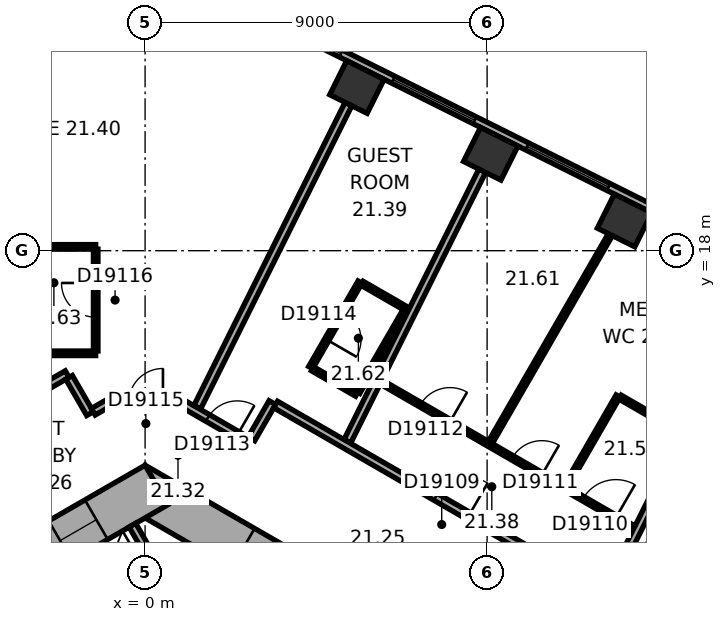
"""IFC4 building model, lengths in metres.
Left out: names, types, materials, properties, quantities, classifications, styles, units other than length and angle.
Written with IfcOpenShell. Run it as: python <this file> out.ifc"""

import sys

from ifc_helpers import new_model, si_unit, direction, frame, frame_2d, origin, origin_2d, place, context, subcontext, project, spatial, rectangle, extrude, element, fill, save


model = new_model("IFC4")
c1 = context("Model", 3, precision=1e-05, world=origin(), true_north=direction((0.0, 1.0)))
c2 = subcontext(c1, "Body", "Model", "MODEL_VIEW")
j1 = project(units=[si_unit("LENGTHUNIT", "METRE"), si_unit("PLANEANGLEUNIT", "RADIAN")], contexts=[c1])
p1 = place(None, origin())
s1 = spatial("IfcSite", under=j1, at=p1, CompositionType="ELEMENT")
p2 = place(p1, origin())
s2 = spatial("IfcBuilding", under=s1, at=p2, CompositionType="ELEMENT")
p3 = place(p2, frame((0.0, 0.0, 93.5)))
s3 = spatial("IfcBuildingStorey", under=s2, at=p3, CompositionType="ELEMENT", Elevation=93.5)
for number, where, z_axis, x_axis in (
    (1, (12.616, 18.795, 0.0), (0.0, 0.0, 1.0), (-0.895, 0.446, 0.0)),
    (2, (9.095, 20.551, 0.0), (0.0, 0.0, 1.0), (-0.895, 0.446, 0.0)),
    (3, (5.574, 22.306, 0.0), (0.0, 0.0, 1.0), (-0.895, 0.446, 0.0)),
):
    element("IfcColumn", number, at=place(p3, frame(where, z_axis=z_axis, x_axis=x_axis)), inside=s3, PredefinedType="COLUMN", context=c2, shape_type="SweptSolid", body=[
        extrude(rectangle(XDim=1.1, YDim=1.0, at=origin_2d()), origin(), (0.0, 0.0, 1.0), 3.3),
    ])
p4 = place(p3, frame((10.4, 5.658, 0.0), z_axis=(0.0, 0.0, 1.0), x_axis=(-0.866021384402, 0.500006961711, 0.0)))
e4 = element("IfcWall", 4, at=p4, inside=s3, PredefinedType="SHEAR", context=c2, shape_type="SweptSolid", body=[
    extrude(rectangle(XDim=12.355, YDim=1.2, at=frame_2d((6.178, 0.0))), origin(), (0.0, 0.0, 1.0), 3.3),
])
p5 = place(p4, frame((2.728, 0.0, 0.0)))
e5 = element("IfcOpeningElement", 5, at=p5, cuts=e4, PredefinedType="OPENING", context=c2, shape_type="SweptSolid", body=[
    extrude(rectangle(XDim=1.1, YDim=2.1, at=frame_2d((0.55, 1.05))), frame((0.0, 0.61, 0.0), z_axis=(0.0, -1.0, 0.0), x_axis=(1.0, 0.0, 0.0)), (0.0, 0.0, 1.0), 1.22),
])
p6 = place(p4, frame((5.328, 0.0, 0.0)))
e6 = element("IfcOpeningElement", 6, at=p6, cuts=e4, PredefinedType="OPENING", context=c2, shape_type="SweptSolid", body=[
    extrude(rectangle(XDim=1.1, YDim=2.1, at=frame_2d((0.55, 1.05))), frame((0.0, 0.61, 0.0), z_axis=(0.0, -1.0, 0.0), x_axis=(1.0, 0.0, 0.0)), (0.0, 0.0, 1.0), 1.22),
])
p7 = place(p4, frame((7.928, 0.0, 0.0)))
e7 = element("IfcOpeningElement", 7, at=p7, cuts=e4, PredefinedType="OPENING", context=c2, shape_type="SweptSolid", body=[
    extrude(rectangle(XDim=1.1, YDim=2.1, at=frame_2d((0.55, 1.05))), frame((0.0, 0.61, 0.0), z_axis=(0.0, -1.0, 0.0), x_axis=(1.0, 0.0, 0.0)), (0.0, 0.0, 1.0), 1.22),
])
p8 = place(p3, frame((0.3, 11.836, 0.0), z_axis=(0.0, 0.0, 1.0), x_axis=(-0.866021384402, -0.500006961711, 0.0)))
e8 = element("IfcWall", 8, at=p8, inside=s3, PredefinedType="SHEAR", context=c2, shape_type="SweptSolid", body=[
    extrude(rectangle(XDim=12.355, YDim=1.2, at=frame_2d((6.178, 0.0))), origin(), (0.0, 0.0, 1.0), 3.3),
])
p9 = place(p8, frame((6.378, 0.0, 0.0)))
e9 = element("IfcOpeningElement", 9, at=p9, cuts=e8, PredefinedType="OPENING", context=c2, shape_type="SweptSolid", body=[
    extrude(rectangle(XDim=1.5, YDim=2.1, at=frame_2d((0.75, 1.05))), frame((0.0, 0.61, 0.0), z_axis=(0.0, -1.0, 0.0), x_axis=(1.0, 0.0, 0.0)), (0.0, 0.0, 1.0), 1.22),
])
p10 = place(p8, frame((1.828, 0.0, 0.0)))
e10 = element("IfcOpeningElement", 10, at=p10, cuts=e8, PredefinedType="OPENING", context=c2, shape_type="SweptSolid", body=[
    extrude(rectangle(XDim=1.1, YDim=2.1, at=frame_2d((0.55, 1.05))), frame((0.0, 0.61, 0.0), z_axis=(0.0, -1.0, 0.0), x_axis=(1.0, 0.0, 0.0)), (0.0, 0.0, 1.0), 1.22),
])
p11 = place(p3, frame((20.63, 15.47, 0.0), z_axis=(0.0, 0.0, 1.0), x_axis=(-0.894934518609, 0.446197498203, 0.0)))
e11 = element("IfcWall", 11, at=p11, inside=s3, PredefinedType="STANDARD", context=c2, shape_type="SweptSolid", body=[
    extrude(rectangle(XDim=21.246, YDim=0.2, at=frame_2d((10.623, 0.0))), origin(), (0.0, 0.0, 1.0), 3.3),
])
p12 = place(p11, frame((1.553, 0.0, 0.8)))
e12 = element("IfcOpeningElement", 12, at=p12, cuts=e11, PredefinedType="OPENING", context=c2, shape_type="SweptSolid", body=[
    extrude(rectangle(XDim=2.4, YDim=1.7, at=frame_2d((1.2, 0.85))), frame((0.0, 0.11, 0.0), z_axis=(0.0, -1.0, 0.0), x_axis=(1.0, 0.0, 0.0)), (0.0, 0.0, 1.0), 0.22),
])
p13 = place(p11, frame((5.488, 0.0, 0.8)))
e13 = element("IfcOpeningElement", 13, at=p13, cuts=e11, PredefinedType="OPENING", context=c2, shape_type="SweptSolid", body=[
    extrude(rectangle(XDim=2.4, YDim=1.7, at=frame_2d((1.2, 0.85))), frame((0.0, 0.11, 0.0), z_axis=(0.0, -1.0, 0.0), x_axis=(1.0, 0.0, 0.0)), (0.0, 0.0, 1.0), 0.22),
])
p14 = place(p11, frame((9.422, 0.0, 0.8)))
e14 = element("IfcOpeningElement", 14, at=p14, cuts=e11, PredefinedType="OPENING", context=c2, shape_type="SweptSolid", body=[
    extrude(rectangle(XDim=2.4, YDim=1.7, at=frame_2d((1.2, 0.85))), frame((0.0, 0.11, 0.0), z_axis=(0.0, -1.0, 0.0), x_axis=(1.0, 0.0, 0.0)), (0.0, 0.0, 1.0), 0.22),
])
p15 = place(p11, frame((13.357, 0.0, 0.8)))
e15 = element("IfcOpeningElement", 15, at=p15, cuts=e11, PredefinedType="OPENING", context=c2, shape_type="SweptSolid", body=[
    extrude(rectangle(XDim=2.4, YDim=1.7, at=frame_2d((1.2, 0.85))), frame((0.0, 0.11, 0.0), z_axis=(0.0, -1.0, 0.0), x_axis=(1.0, 0.0, 0.0)), (0.0, 0.0, 1.0), 0.22),
])
p16 = place(p11, frame((17.292, 0.0, 0.8)))
e16 = element("IfcOpeningElement", 16, at=p16, cuts=e11, PredefinedType="OPENING", context=c2, shape_type="SweptSolid", body=[
    extrude(rectangle(XDim=2.4, YDim=1.7, at=frame_2d((1.2, 0.85))), frame((0.0, 0.11, 0.0), z_axis=(0.0, -1.0, 0.0), x_axis=(1.0, 0.0, 0.0)), (0.0, 0.0, 1.0), 0.22),
])
p17 = place(p3, frame((0.767, 8.872, 0.0), z_axis=(0.0, 0.0, 1.0), x_axis=(-0.499994660107, 0.866028486751, 0.0)))
e17 = element("IfcWall", 17, at=p17, inside=s3, PredefinedType="PARTITIONING", context=c2, shape_type="SweptSolid", body=[
    extrude(rectangle(XDim=2.2, YDim=0.2, at=frame_2d((1.1, 0.0))), origin(), (0.0, 0.0, 1.0), 3.05),
])
p18 = place(p3, frame((-3.44, 18.101, 0.0), z_axis=(0.0, 0.0, 1.0), x_axis=(1.0, 0.0, 0.0)))
e18 = element("IfcWall", 18, at=p18, inside=s3, PredefinedType="PARTITIONING", context=c2, shape_type="SweptSolid", body=[
    extrude(rectangle(XDim=2.14, YDim=0.12, at=frame_2d((1.07, 0.0))), origin(), (0.0, 0.0, 1.0), 3.05),
])
p19 = place(p3, frame((-2.05, 14.752, 0.0), z_axis=(0.0, 0.0, 1.0), x_axis=(-0.866030936828, -0.499990416364, 0.0)))
e19 = element("IfcWall", 19, at=p19, inside=s3, PredefinedType="PARTITIONING", context=c2, shape_type="SweptSolid", body=[
    extrude(rectangle(XDim=3.102, YDim=0.2, at=frame_2d((1.551, 0.0))), origin(), (0.0, 0.0, 1.0), 3.05),
])
p20 = place(p3, frame((-1.449, 13.712, 0.0), z_axis=(0.0, 0.0, 1.0), x_axis=(-0.499978356969, 0.866037899034, 0.0)))
e20 = element("IfcWall", 20, at=p20, inside=s3, PredefinedType="PARTITIONING", context=c2, shape_type="SweptSolid", body=[
    extrude(rectangle(XDim=1.101, YDim=0.2, at=frame_2d((0.551, 0.0))), origin(), (0.0, 0.0, 1.0), 3.05),
])
p21 = place(p3, frame((-1.3, 15.301, 0.0), z_axis=(0.0, 0.0, 1.0), x_axis=(-1.0, 0.0, 0.0)))
e21 = element("IfcWall", 21, at=p21, inside=s3, PredefinedType="PARTITIONING", context=c2, shape_type="SweptSolid", body=[
    extrude(rectangle(XDim=1.661, YDim=0.12, at=frame_2d((0.831, 0.0))), origin(), (0.0, 0.0, 1.0), 3.05),
])
p22 = place(p3, frame((-1.3, 18.041, 0.0), z_axis=(0.0, 0.0, 1.0), x_axis=(0.0, -1.0, 0.0)))
e22 = element("IfcWall", 22, at=p22, inside=s3, PredefinedType="PARTITIONING", context=c2, shape_type="SweptSolid", body=[
    extrude(rectangle(XDim=2.68, YDim=0.12, at=frame_2d((1.34, 0.0))), origin(), (0.0, 0.0, 1.0), 3.05),
])
p23 = place(p22, frame((0.89, 0.0, 0.0)))
e23 = element("IfcOpeningElement", 23, at=p23, cuts=e22, PredefinedType="OPENING", context=c2, shape_type="SweptSolid", body=[
    extrude(rectangle(XDim=0.9, YDim=2.1, at=frame_2d((0.45, 1.05))), frame((0.0, 0.07, 0.0), z_axis=(0.0, -1.0, 0.0), x_axis=(1.0, 0.0, 0.0)), (0.0, 0.0, 1.0), 0.14),
])
p24 = place(p3, frame((-0.95, 14.001, 0.0), z_axis=(0.0, 0.0, 1.0), x_axis=(-0.86609177584, -0.499885022602, 0.0)))
e24 = element("IfcWall", 24, at=p24, inside=s3, PredefinedType="PARTITIONING", context=c2, shape_type="SweptSolid", body=[
    extrude(rectangle(XDim=0.477, YDim=0.2, at=frame_2d((0.238, 0.0))), origin(), (0.0, 0.0, 1.0), 3.05),
])
p25 = place(p3, frame((0.95, 14.001, 0.0), z_axis=(0.0, 0.0, 1.0), x_axis=(-1.0, 0.0, 0.0)))
e25 = element("IfcWall", 25, at=p25, inside=s3, PredefinedType="PARTITIONING", context=c2, shape_type="SweptSolid", body=[
    extrude(rectangle(XDim=1.86, YDim=0.2, at=frame_2d((0.93, 0.0))), origin(), (0.0, 0.0, 1.0), 3.05),
])
p26 = place(p25, frame((0.48, 0.0, 0.0)))
e26 = element("IfcOpeningElement", 26, at=p26, cuts=e25, PredefinedType="OPENING", context=c2, shape_type="SweptSolid", body=[
    extrude(rectangle(XDim=0.9, YDim=2.1, at=frame_2d((0.45, 1.05))), frame((0.0, 0.11, 0.0), z_axis=(0.0, -1.0, 0.0), x_axis=(1.0, 0.0, 0.0)), (0.0, 0.0, 1.0), 0.22),
])
p27 = place(p3, frame((2.748, 12.962, 0.0), z_axis=(0.0, 0.0, 1.0), x_axis=(-0.866013897511, 0.50001992892, 0.0)))
e27 = element("IfcWall", 27, at=p27, inside=s3, PredefinedType="PARTITIONING", context=c2, shape_type="SweptSolid", body=[
    extrude(rectangle(XDim=2.037, YDim=0.2, at=frame_2d((1.018, 0.0))), origin(), (0.0, 0.0, 1.0), 3.05),
])
p28 = place(p27, frame((0.372, 0.0, 0.0)))
e28 = element("IfcOpeningElement", 28, at=p28, cuts=e27, PredefinedType="OPENING", context=c2, shape_type="SweptSolid", body=[
    extrude(rectangle(XDim=0.9, YDim=2.1, at=frame_2d((0.45, 1.05))), frame((0.0, 0.11, 0.0), z_axis=(0.0, -1.0, 0.0), x_axis=(1.0, 0.0, 0.0)), (0.0, 0.0, 1.0), 0.22),
])
p29 = place(p3, frame((3.349, 14.002, 0.0), z_axis=(0.0, 0.0, 1.0), x_axis=(-0.500074377092, -0.865982457891, 0.0)))
e29 = element("IfcWall", 29, at=p29, inside=s3, PredefinedType="PARTITIONING", context=c2, shape_type="SweptSolid", body=[
    extrude(rectangle(XDim=1.101, YDim=0.2, at=frame_2d((0.55, 0.0))), origin(), (0.0, 0.0, 1.0), 3.05),
])
p30 = place(p3, frame((4.356, 14.922, 0.0), z_axis=(0.0, 0.0, 1.0), x_axis=(0.499936506574, 0.866062058628, 0.0)))
e30 = element("IfcWall", 30, at=p30, inside=s3, PredefinedType="PARTITIONING", context=c2, shape_type="SweptSolid", body=[
    extrude(rectangle(XDim=2.6, YDim=0.12, at=frame_2d((1.3, 0.0))), origin(), (0.0, 0.0, 1.0), 3.05),
])
p31 = place(p30, frame((0.85, 0.0, 0.0)))
e31 = element("IfcOpeningElement", 31, at=p31, cuts=e30, PredefinedType="OPENING", context=c2, shape_type="SweptSolid", body=[
    extrude(rectangle(XDim=0.9, YDim=2.1, at=frame_2d((0.45, 1.05))), frame((0.0, 0.07, 0.0), z_axis=(0.0, -1.0, 0.0), x_axis=(1.0, 0.0, 0.0)), (0.0, 0.0, 1.0), 0.14),
])
p32 = place(p3, frame((5.351, 21.859, 0.0), z_axis=(0.0, 0.0, 1.0), x_axis=(-0.446205309328, -0.894930624086, 0.0)))
e32 = element("IfcWall", 32, at=p32, inside=s3, PredefinedType="PARTITIONING", context=c2, shape_type="SweptSolid", body=[
    extrude(rectangle(XDim=8.913, YDim=0.2, at=frame_2d((4.457, 0.0))), origin(), (0.0, 0.0, 1.0), 2.6),
])
p33 = place(p3, frame((5.569, 14.222, 0.0), z_axis=(0.0, 0.0, 1.0), x_axis=(-0.866036909293, 0.499980071345, 0.0)))
e33 = element("IfcWall", 33, at=p33, inside=s3, PredefinedType="PARTITIONING", context=c2, shape_type="SweptSolid", body=[
    extrude(rectangle(XDim=1.34, YDim=0.12, at=frame_2d((0.67, 0.0))), origin(), (0.0, 0.0, 1.0), 3.05),
])
p34 = place(p3, frame((5.708, 17.144, 0.0), z_axis=(0.0, 0.0, 1.0), x_axis=(0.866082447003, -0.499901185229, 0.0)))
e34 = element("IfcWall", 34, at=p34, inside=s3, PredefinedType="PARTITIONING", context=c2, shape_type="SweptSolid", body=[
    extrude(rectangle(XDim=1.34, YDim=0.12, at=frame_2d((0.67, 0.0))), origin(), (0.0, 0.0, 1.0), 3.05),
])
p35 = place(p3, frame((6.839, 16.422, 0.0), z_axis=(0.0, 0.0, 1.0), x_axis=(-0.50000366821, -0.866023285932, 0.0)))
e35 = element("IfcWall", 35, at=p35, inside=s3, PredefinedType="PARTITIONING", context=c2, shape_type="SweptSolid", body=[
    extrude(rectangle(XDim=2.48, YDim=0.12, at=frame_2d((1.24, 0.0))), origin(), (0.0, 0.0, 1.0), 3.05),
])
p36 = place(p3, frame((8.872, 20.104, 0.0), z_axis=(0.0, 0.0, 1.0), x_axis=(-0.446218378653, -0.894924107706, 0.0)))
e36 = element("IfcWall", 36, at=p36, inside=s3, PredefinedType="PARTITIONING", context=c2, shape_type="SweptSolid", body=[
    extrude(rectangle(XDim=7.95, YDim=0.2, at=frame_2d((3.975, 0.0))), origin(), (0.0, 0.0, 1.0), 3.05),
])
p37 = place(p3, frame((10.885, 9.652, 0.0), z_axis=(0.0, 0.0, 1.0), x_axis=(-0.866033868542, 0.499985338323, 0.0)))
e37 = element("IfcWall", 37, at=p37, inside=s3, PredefinedType="PARTITIONING", context=c2, shape_type="SweptSolid", body=[
    extrude(rectangle(XDim=8.602, YDim=0.2, at=frame_2d((4.301, 0.0))), origin(), (0.0, 0.0, 1.0), 3.05),
])
p38 = place(p37, frame((2.739, 0.0, 0.0)))
e38 = element("IfcOpeningElement", 38, at=p38, cuts=e37, PredefinedType="OPENING", context=c2, shape_type="SweptSolid", body=[
    extrude(rectangle(XDim=1.0, YDim=2.1, at=frame_2d((0.5, 1.05))), frame((0.0, 0.11, 0.0), z_axis=(0.0, -1.0, 0.0), x_axis=(1.0, 0.0, 0.0)), (0.0, 0.0, 1.0), 0.22),
])
p39 = place(p3, frame((12.243, 18.423, 0.0), z_axis=(0.0, 0.0, 1.0), x_axis=(-0.499993523031, -0.866029143232, 0.0)))
e39 = element("IfcWall", 39, at=p39, inside=s3, PredefinedType="PARTITIONING", context=c2, shape_type="SweptSolid", body=[
    extrude(rectangle(XDim=6.315, YDim=0.12, at=frame_2d((3.157, 0.0))), origin(), (0.0, 0.0, 1.0), 2.6),
])
p40 = place(p3, frame((12.448, 14.177, 0.0), z_axis=(0.0, 0.0, 1.0), x_axis=(-0.500048966069, -0.865997131366, 0.0)))
e40 = element("IfcWall", 40, at=p40, inside=s3, PredefinedType="PARTITIONING", context=c2, shape_type="SweptSolid", body=[
    extrude(rectangle(XDim=2.74, YDim=0.12, at=frame_2d((1.37, 0.0))), origin(), (0.0, 0.0, 1.0), 3.05),
])
p41 = place(p3, frame((12.866, 10.702, 0.0), z_axis=(0.0, 0.0, 1.0), x_axis=(-0.866023151433, 0.500003901167, 0.0)))
e41 = element("IfcWall", 41, at=p41, inside=s3, PredefinedType="PARTITIONING", context=c2, shape_type="SweptSolid", body=[
    extrude(rectangle(XDim=7.684, YDim=0.12, at=frame_2d((3.842, 0.0))), origin(), (0.0, 0.0, 1.0), 3.05),
])
p42 = place(p41, frame((0.55, 0.0, 0.0)))
e42 = element("IfcOpeningElement", 42, at=p42, cuts=e41, PredefinedType="OPENING", context=c2, shape_type="SweptSolid", body=[
    extrude(rectangle(XDim=1.0, YDim=2.1, at=frame_2d((0.5, 1.05))), frame((0.0, 0.07, 0.0), z_axis=(0.0, -1.0, 0.0), x_axis=(1.0, 0.0, 0.0)), (0.0, 0.0, 1.0), 0.14),
])
p43 = place(p41, frame((2.8, 0.0, 0.0)))
e43 = element("IfcOpeningElement", 43, at=p43, cuts=e41, PredefinedType="OPENING", context=c2, shape_type="SweptSolid", body=[
    extrude(rectangle(XDim=0.9, YDim=2.1, at=frame_2d((0.45, 1.05))), frame((0.0, 0.07, 0.0), z_axis=(0.0, -1.0, 0.0), x_axis=(1.0, 0.0, 0.0)), (0.0, 0.0, 1.0), 0.14),
])
p44 = place(p41, frame((5.592, 0.0, 0.0)))
e44 = element("IfcOpeningElement", 44, at=p44, cuts=e41, PredefinedType="OPENING", context=c2, shape_type="SweptSolid", body=[
    extrude(rectangle(XDim=0.9, YDim=2.1, at=frame_2d((0.45, 1.05))), frame((0.0, 0.07, 0.0), z_axis=(0.0, -1.0, 0.0), x_axis=(1.0, 0.0, 0.0)), (0.0, 0.0, 1.0), 0.14),
])
p45 = place(p3, frame((14.118, 13.212, 0.0), z_axis=(0.0, 0.0, 1.0), x_axis=(-0.866039825209, 0.499975020527, 0.0)))
e45 = element("IfcWall", 45, at=p45, inside=s3, PredefinedType="PARTITIONING", context=c2, shape_type="SweptSolid", body=[
    extrude(rectangle(XDim=1.869, YDim=0.12, at=frame_2d((0.934, 0.0))), origin(), (0.0, 0.0, 1.0), 3.05),
])
p46 = place(p3, frame((15.915, 16.592, 0.0), z_axis=(0.0, 0.0, 1.0), x_axis=(-0.446199736347, -0.894933402709, 0.0)))
e46 = element("IfcWall", 46, at=p46, inside=s3, PredefinedType="PARTITIONING", context=c2, shape_type="SweptSolid", body=[
    extrude(rectangle(XDim=9.635, YDim=0.2, at=frame_2d((4.817, 0.0))), origin(), (0.0, 0.0, 1.0), 3.05),
])
p47 = place(p14, origin())
e47 = element("IfcWindow", 47, at=p47, inside=s3, PartitioningType="SINGLE_PANEL", PredefinedType="WINDOW", context=c2, shape_type="SweptSolid", body=[
    extrude(rectangle(XDim=2.4, YDim=1.7, at=frame_2d((1.2, 0.85))), frame((0.0, 0.03, 0.0), z_axis=(0.0, -1.0, 0.0), x_axis=(1.0, 0.0, 0.0)), (0.0, 0.0, 1.0), 0.06),
])
fill(e14, e47)
p48 = place(p15, origin())
e48 = element("IfcWindow", 48, at=p48, inside=s3, PartitioningType="SINGLE_PANEL", PredefinedType="WINDOW", context=c2, shape_type="SweptSolid", body=[
    extrude(rectangle(XDim=2.4, YDim=1.7, at=frame_2d((1.2, 0.85))), frame((0.0, 0.03, 0.0), z_axis=(0.0, -1.0, 0.0), x_axis=(1.0, 0.0, 0.0)), (0.0, 0.0, 1.0), 0.06),
])
fill(e15, e48)
p49 = place(p16, origin())
e49 = element("IfcWindow", 49, at=p49, inside=s3, PartitioningType="SINGLE_PANEL", PredefinedType="WINDOW", context=c2, shape_type="SweptSolid", body=[
    extrude(rectangle(XDim=2.4, YDim=1.7, at=frame_2d((1.2, 0.85))), frame((0.0, 0.03, 0.0), z_axis=(0.0, -1.0, 0.0), x_axis=(1.0, 0.0, 0.0)), (0.0, 0.0, 1.0), 0.06),
])
fill(e16, e49)
p50 = place(p10, origin())
e50 = element("IfcDoor", 50, at=p50, inside=s3, OperationType="DOUBLE_DOOR_SLIDING", PredefinedType="DOOR", context=c2, shape_type="SweptSolid", body=[
    extrude(rectangle(XDim=1.1, YDim=2.1, at=frame_2d((0.55, 1.05))), frame((0.0, 0.025, 0.0), z_axis=(0.0, -1.0, 0.0), x_axis=(1.0, 0.0, 0.0)), (0.0, 0.0, 1.0), 0.05),
])
fill(e10, e50)
p51 = place(p38, origin())
e51 = element("IfcDoor", 51, at=p51, inside=s3, OperationType="SINGLE_SWING_LEFT", PredefinedType="DOOR", context=c2, shape_type="SweptSolid", body=[
    extrude(rectangle(XDim=1.0, YDim=2.1, at=frame_2d((0.5, 1.05))), frame((0.0, 0.025, 0.0), z_axis=(0.0, -1.0, 0.0), x_axis=(1.0, 0.0, 0.0)), (0.0, 0.0, 1.0), 0.05),
])
fill(e38, e51)
p52 = place(p42, origin())
e52 = element("IfcDoor", 52, at=p52, inside=s3, OperationType="SINGLE_SWING_LEFT", PredefinedType="DOOR", context=c2, shape_type="SweptSolid", body=[
    extrude(rectangle(XDim=1.0, YDim=2.1, at=frame_2d((0.5, 1.05))), frame((0.0, 0.025, 0.0), z_axis=(0.0, -1.0, 0.0), x_axis=(1.0, 0.0, 0.0)), (0.0, 0.0, 1.0), 0.05),
])
fill(e42, e52)
p53 = place(p43, origin())
e53 = element("IfcDoor", 53, at=p53, inside=s3, OperationType="SINGLE_SWING_LEFT", PredefinedType="DOOR", context=c2, shape_type="SweptSolid", body=[
    extrude(rectangle(XDim=0.9, YDim=2.1, at=frame_2d((0.45, 1.05))), frame((0.0, 0.025, 0.0), z_axis=(0.0, -1.0, 0.0), x_axis=(1.0, 0.0, 0.0)), (0.0, 0.0, 1.0), 0.05),
])
fill(e43, e53)
p54 = place(p44, origin())
e54 = element("IfcDoor", 54, at=p54, inside=s3, OperationType="SINGLE_SWING_LEFT", PredefinedType="DOOR", context=c2, shape_type="SweptSolid", body=[
    extrude(rectangle(XDim=0.9, YDim=2.1, at=frame_2d((0.45, 1.05))), frame((0.0, 0.025, 0.0), z_axis=(0.0, -1.0, 0.0), x_axis=(1.0, 0.0, 0.0)), (0.0, 0.0, 1.0), 0.05),
])
fill(e44, e54)
p55 = place(p28, origin())
e55 = element("IfcDoor", 55, at=p55, inside=s3, OperationType="SINGLE_SWING_LEFT", PredefinedType="DOOR", context=c2, shape_type="SweptSolid", body=[
    extrude(rectangle(XDim=0.9, YDim=2.1, at=frame_2d((0.45, 1.05))), frame((0.0, 0.025, 0.0), z_axis=(0.0, -1.0, 0.0), x_axis=(1.0, 0.0, 0.0)), (0.0, 0.0, 1.0), 0.05),
])
fill(e28, e55)
p56 = place(p31, origin())
e56 = element("IfcDoor", 56, at=p56, inside=s3, OperationType="SINGLE_SWING_LEFT", PredefinedType="DOOR", context=c2, shape_type="SweptSolid", body=[
    extrude(rectangle(XDim=0.9, YDim=2.1, at=frame_2d((0.45, 1.05))), frame((0.0, 0.025, 0.0), z_axis=(0.0, -1.0, 0.0), x_axis=(1.0, 0.0, 0.0)), (0.0, 0.0, 1.0), 0.05),
])
fill(e31, e56)
p57 = place(p26, origin())
e57 = element("IfcDoor", 57, at=p57, inside=s3, OperationType="SINGLE_SWING_LEFT", PredefinedType="DOOR", context=c2, shape_type="SweptSolid", body=[
    extrude(rectangle(XDim=0.9, YDim=2.1, at=frame_2d((0.45, 1.05))), frame((0.0, 0.025, 0.0), z_axis=(0.0, -1.0, 0.0), x_axis=(1.0, 0.0, 0.0)), (0.0, 0.0, 1.0), 0.05),
])
fill(e26, e57)
p58 = place(p23, origin())
e58 = element("IfcDoor", 58, at=p58, inside=s3, OperationType="SINGLE_SWING_LEFT", PredefinedType="DOOR", context=c2, shape_type="SweptSolid", body=[
    extrude(rectangle(XDim=0.9, YDim=2.1, at=frame_2d((0.45, 1.05))), frame((0.0, 0.025, 0.0), z_axis=(0.0, -1.0, 0.0), x_axis=(1.0, 0.0, 0.0)), (0.0, 0.0, 1.0), 0.05),
])
fill(e23, e58)
save(model, sys.argv[1])
